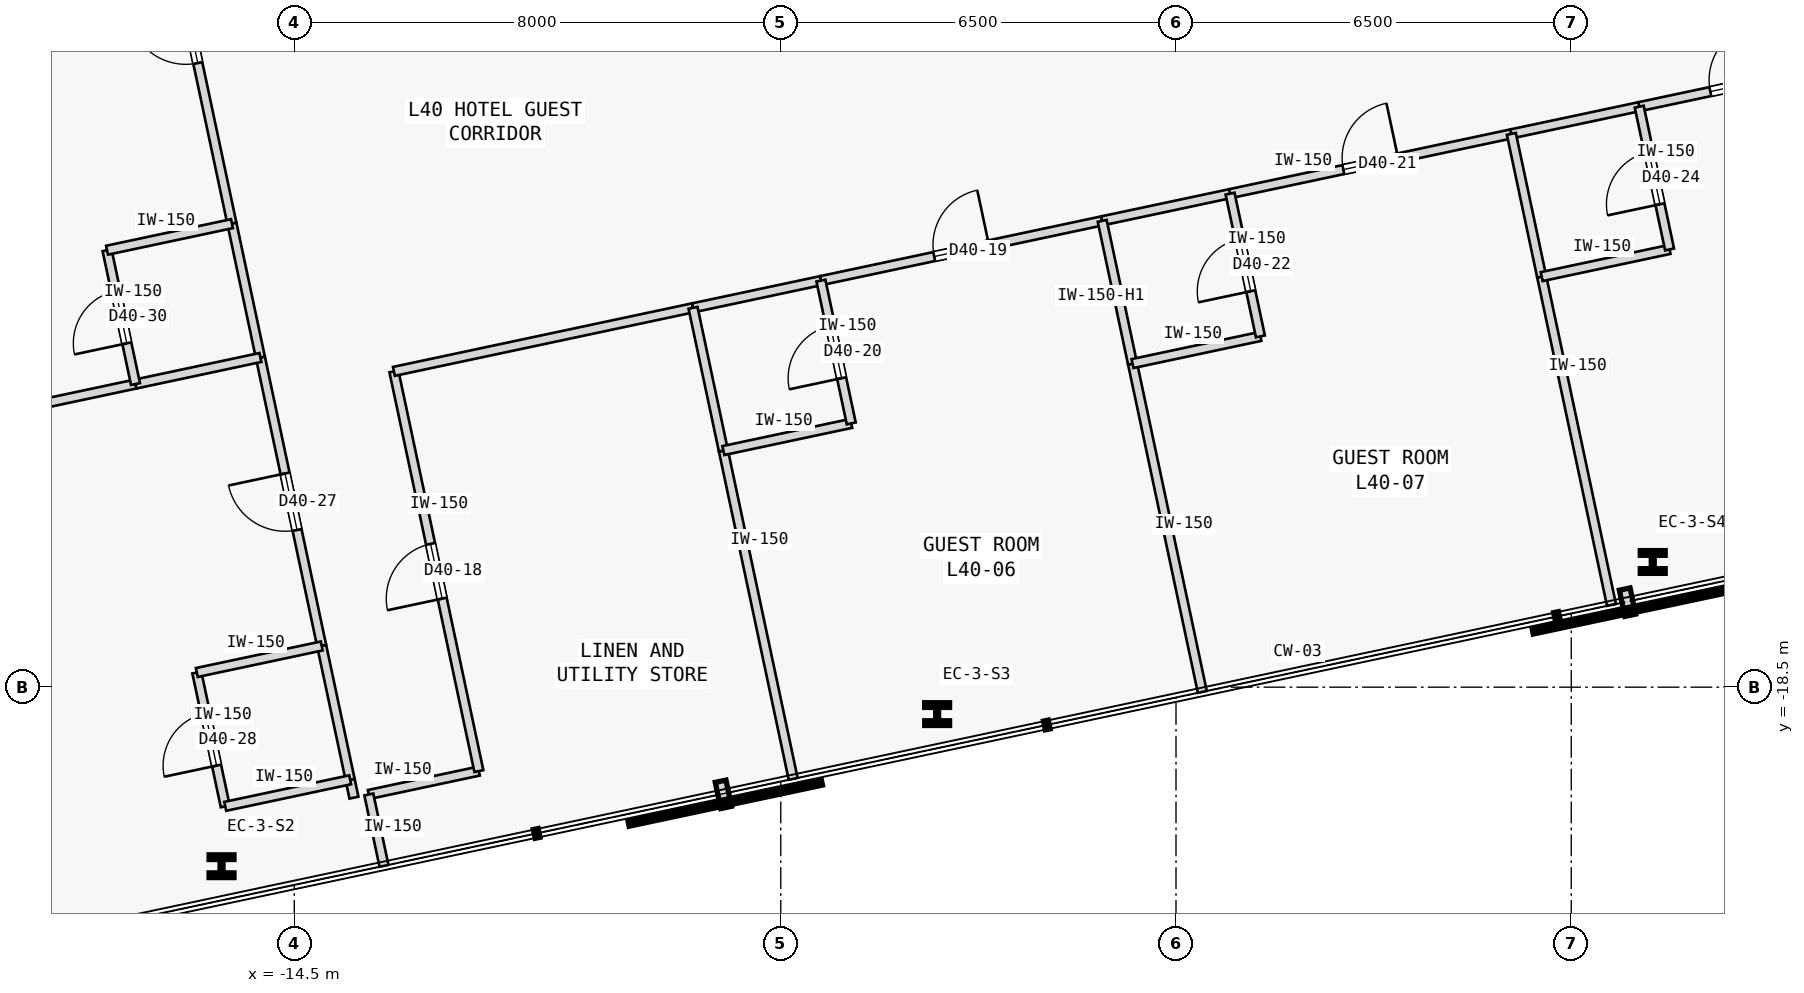
"""IFC4 building model, lengths in metres.
Left out: names, types, materials, properties, quantities, classifications, styles, units other than length and angle.
Written with IfcOpenShell. Run it as: python <this file> out.ifc"""

import sys

from ifc_helpers import new_model, si_unit, direction, frame, frame_2d, origin, origin_2d, place, context, subcontext, project, spatial, rectangle, i_section, extrude, element, fill, save


model = new_model("IFC4")
c1 = context("Model", 3, precision=1e-05, world=origin(), true_north=direction((0.0, 1.0)))
c2 = subcontext(c1, "Body", "Model", "MODEL_VIEW")
j1 = project(units=[si_unit("LENGTHUNIT", "METRE"), si_unit("PLANEANGLEUNIT", "RADIAN")], contexts=[c1])
p1 = place(None, origin())
s1 = spatial("IfcSite", under=j1, at=p1, CompositionType="ELEMENT")
p2 = place(p1, origin())
s2 = spatial("IfcBuilding", under=s1, at=p2, CompositionType="ELEMENT")
p3 = place(p2, frame((0.0, 0.0, 158.2)))
s3 = spatial("IfcBuildingStorey", under=s2, at=p3, CompositionType="ELEMENT", Elevation=158.2)
for number, where, z_axis, x_axis in (
    (1, (-15.697, -21.444, 0.0), (0.0, 0.0, 1.0), (1.0, 0.0, 0.0)),
    (2, (-3.928, -18.943, 0.0), (0.0, 0.0, 1.0), (1.0, 0.0, 0.0)),
    (3, (7.84, -16.441, 0.0), (0.0, 0.0, 1.0), (1.0, 0.0, 0.0)),
):
    element("IfcColumn", number, at=place(p3, frame(where, z_axis=z_axis, x_axis=x_axis)), inside=s3, PredefinedType="COLUMN", context=c2, shape_type="SweptSolid", body=[
        extrude(i_section(OverallWidth=0.409, OverallDepth=0.374, WebThickness=0.048, FlangeThickness=0.077, FilletRadius=0.015, at=origin_2d()), origin(), (0.0, 0.0, 1.0), 3.4),
    ])
p4 = place(p3, frame((-13.274, -20.265, 0.0), z_axis=(0.0, 0.0, 1.0), x_axis=(0.978160192495, 0.207852442415, 0.0)))
e4 = element("IfcWall", 4, at=p4, inside=s3, PredefinedType="PARTITIONING", context=c2, shape_type="SweptSolid", body=[
    extrude(rectangle(XDim=1.85, YDim=0.15, at=frame_2d((0.925, 0.0))), origin(), (0.0, 0.0, 1.0), 3.175),
])
p5 = place(p3, frame((-11.465, -19.88, 0.0), z_axis=(0.0, 0.0, 1.0), x_axis=(-0.207916109912, 0.978146661416, 0.0)))
e5 = element("IfcWall", 5, at=p5, inside=s3, PredefinedType="PARTITIONING", context=c2, shape_type="SweptSolid", body=[
    extrude(rectangle(XDim=6.72, YDim=0.15, at=frame_2d((3.36, 0.0))), origin(), (0.0, 0.0, 1.0), 3.175),
])
p6 = place(p5, frame((2.9, 0.0, 0.0)))
e6 = element("IfcOpeningElement", 6, at=p6, cuts=e5, PredefinedType="OPENING", context=c2, shape_type="SweptSolid", body=[
    extrude(rectangle(XDim=0.92, YDim=2.15, at=frame_2d((0.46, 1.075))), frame((0.0, 0.085, 0.0), z_axis=(0.0, -1.0, 0.0), x_axis=(1.0, 0.0, 0.0)), (0.0, 0.0, 1.0), 0.17),
])
p7 = place(p3, frame((-12.862, -13.307, 0.0), z_axis=(0.0, 0.0, 1.0), x_axis=(0.978145647498, 0.207920879857, 0.0)))
e7 = element("IfcWall", 7, at=p7, inside=s3, PredefinedType="PARTITIONING", context=c2, shape_type="SweptSolid", body=[
    extrude(rectangle(XDim=5.029, YDim=0.15, at=frame_2d((2.515, 0.0))), origin(), (0.0, 0.0, 1.0), 3.175),
])
p8 = place(p3, frame((-5.84, -11.814, 0.0), z_axis=(0.0, 0.0, 1.0), x_axis=(0.978148615161, 0.207906918255, 0.0)))
e8 = element("IfcWall", 8, at=p8, inside=s3, PredefinedType="PARTITIONING", context=c2, shape_type="SweptSolid", body=[
    extrude(rectangle(XDim=4.729, YDim=0.15, at=frame_2d((2.364, 0.0))), origin(), (0.0, 0.0, 1.0), 3.175),
])
p9 = place(p8, frame((1.905, 0.0, 0.0)))
e9 = element("IfcOpeningElement", 9, at=p9, cuts=e8, PredefinedType="OPENING", context=c2, shape_type="SweptSolid", body=[
    extrude(rectangle(XDim=0.92, YDim=2.15, at=frame_2d((0.46, 1.075))), frame((0.0, 0.085, 0.0), z_axis=(0.0, -1.0, 0.0), x_axis=(1.0, 0.0, 0.0)), (0.0, 0.0, 1.0), 0.17),
])
p10 = place(p3, frame((-7.943, -12.261, 0.0), z_axis=(0.0, 0.0, 1.0), x_axis=(0.978146728319, 0.207915795165, 0.0)))
e10 = element("IfcWall", 10, at=p10, inside=s3, PredefinedType="PARTITIONING", context=c2, shape_type="SweptSolid", body=[
    extrude(rectangle(XDim=2.15, YDim=0.15, at=frame_2d((1.075, 0.0))), origin(), (0.0, 0.0, 1.0), 3.175),
])
p11 = place(p3, frame((0.889, -10.384, 0.0), z_axis=(0.0, 0.0, 1.0), x_axis=(0.978150846638, 0.207896419455, 0.0)))
e11 = element("IfcWall", 11, at=p11, inside=s3, PredefinedType="PARTITIONING", context=c2, shape_type="SweptSolid", body=[
    extrude(rectangle(XDim=4.729, YDim=0.15, at=frame_2d((2.365, 0.0))), origin(), (0.0, 0.0, 1.0), 3.175),
])
p12 = place(p11, frame((1.905, 0.0, 0.0)))
e12 = element("IfcOpeningElement", 12, at=p12, cuts=e11, PredefinedType="OPENING", context=c2, shape_type="SweptSolid", body=[
    extrude(rectangle(XDim=0.92, YDim=2.15, at=frame_2d((0.46, 1.075))), frame((0.0, 0.085, 0.0), z_axis=(0.0, -1.0, 0.0), x_axis=(1.0, 0.0, 0.0)), (0.0, 0.0, 1.0), 0.17),
])
p13 = place(p3, frame((-1.214, -10.831, 0.0), z_axis=(0.0, 0.0, 1.0), x_axis=(0.978146728319, 0.207915795165, 0.0)))
e13 = element("IfcWall", 13, at=p13, inside=s3, PredefinedType="PARTITIONING", context=c2, shape_type="SweptSolid", body=[
    extrude(rectangle(XDim=2.15, YDim=0.15, at=frame_2d((1.075, 0.0))), origin(), (0.0, 0.0, 1.0), 3.175),
])
p14 = place(p3, frame((7.618, -8.954, 0.0), z_axis=(0.0, 0.0, 1.0), x_axis=(0.978140347221, 0.207945812984, 0.0)))
e14 = element("IfcWall", 14, at=p14, inside=s3, PredefinedType="PARTITIONING", context=c2, shape_type="SweptSolid", body=[
    extrude(rectangle(XDim=4.729, YDim=0.15, at=frame_2d((2.365, 0.0))), origin(), (0.0, 0.0, 1.0), 3.175),
])
p15 = place(p14, frame((1.195, 0.0, 0.0)))
e15 = element("IfcOpeningElement", 15, at=p15, cuts=e14, PredefinedType="OPENING", context=c2, shape_type="SweptSolid", body=[
    extrude(rectangle(XDim=0.92, YDim=2.15, at=frame_2d((0.46, 1.075))), frame((0.0, 0.085, 0.0), z_axis=(0.0, -1.0, 0.0), x_axis=(1.0, 0.0, 0.0)), (0.0, 0.0, 1.0), 0.17),
])
p16 = place(p3, frame((5.515, -9.401, 0.0), z_axis=(0.0, 0.0, 1.0), x_axis=(0.978146728319, 0.207915795165, 0.0)))
e16 = element("IfcWall", 16, at=p16, inside=s3, PredefinedType="PARTITIONING", context=c2, shape_type="SweptSolid", body=[
    extrude(rectangle(XDim=2.15, YDim=0.15, at=frame_2d((1.075, 0.0))), origin(), (0.0, 0.0, 1.0), 3.175),
])
p17 = place(p3, frame((-13.519, -20.317, 0.0), z_axis=(0.0, 0.0, 1.0), x_axis=(-0.207527808066, 0.978229118806, 0.0)))
e17 = element("IfcWall", 17, at=p17, inside=s3, PredefinedType="PARTITIONING", context=c2, shape_type="SweptSolid", body=[
    extrude(rectangle(XDim=0.3, YDim=0.15, at=frame_2d((0.15, 0.0))), origin(), (0.0, 0.0, 1.0), 3.175),
])
p18 = place(p3, frame((-14.049, -17.823, 0.0), z_axis=(0.0, 0.0, 1.0), x_axis=(-0.2079027059, 0.978149510494, 0.0)))
e18 = element("IfcWall", 18, at=p18, inside=s3, PredefinedType="PARTITIONING", context=c2, shape_type="SweptSolid", body=[
    extrude(rectangle(XDim=4.85, YDim=0.15, at=frame_2d((2.425, 0.0))), origin(), (0.0, 0.0, 1.0), 3.175),
])
p19 = place(p18, frame((1.95, 0.0, 0.0)))
e19 = element("IfcOpeningElement", 19, at=p19, cuts=e18, PredefinedType="OPENING", context=c2, shape_type="SweptSolid", body=[
    extrude(rectangle(XDim=0.95, YDim=2.15, at=frame_2d((0.475, 1.075))), frame((0.0, 0.085, 0.0), z_axis=(0.0, -1.0, 0.0), x_axis=(1.0, 0.0, 0.0)), (0.0, 0.0, 1.0), 0.17),
])
p20 = place(p3, frame((-13.581, -20.023, 0.0), z_axis=(0.0, 0.0, 1.0), x_axis=(-0.207891197838, 0.978151956427, 0.0)))
e20 = element("IfcWall", 20, at=p20, inside=s3, PredefinedType="PARTITIONING", context=c2, shape_type="SweptSolid", body=[
    extrude(rectangle(XDim=2.25, YDim=0.15, at=frame_2d((1.125, 0.0))), origin(), (0.0, 0.0, 1.0), 3.175),
])
p21 = place(p3, frame((-15.525, -10.878, 0.0), z_axis=(0.0, 0.0, 1.0), x_axis=(-0.207887725283, 0.978152694459, 0.0)))
e21 = element("IfcWall", 21, at=p21, inside=s3, PredefinedType="PARTITIONING", context=c2, shape_type="SweptSolid", body=[
    extrude(rectangle(XDim=6.35, YDim=0.15, at=frame_2d((3.175, 0.0))), origin(), (0.0, 0.0, 1.0), 3.175),
])
p22 = place(p21, frame((2.7, 0.0, 0.0)))
e22 = element("IfcOpeningElement", 22, at=p22, cuts=e21, PredefinedType="OPENING", context=c2, shape_type="SweptSolid", body=[
    extrude(rectangle(XDim=0.95, YDim=2.15, at=frame_2d((0.475, 1.075))), frame((0.0, 0.085, 0.0), z_axis=(0.0, -1.0, 0.0), x_axis=(1.0, 0.0, 0.0)), (0.0, 0.0, 1.0), 0.17),
])
p23 = place(p3, frame((-15.057, -13.079, 0.0), z_axis=(0.0, 0.0, 1.0), x_axis=(-0.207995007687, 0.978129887478, 0.0)))
e23 = element("IfcWall", 23, at=p23, inside=s3, PredefinedType="PARTITIONING", context=c2, shape_type="SweptSolid", body=[
    extrude(rectangle(XDim=2.25, YDim=0.15, at=frame_2d((1.125, 0.0))), origin(), (0.0, 0.0, 1.0), 3.175),
])
p24 = place(p3, frame((-6.296, -20.008, 0.0), z_axis=(0.0, 0.0, 1.0), x_axis=(-0.20792487872, 0.978144797466, 0.0)))
e24 = element("IfcWall", 24, at=p24, inside=s3, PredefinedType="PARTITIONING", context=c2, shape_type="SweptSolid", body=[
    extrude(rectangle(XDim=5.52, YDim=0.15, at=frame_2d((2.76, 0.0))), origin(), (0.0, 0.0, 1.0), 3.175),
])
p25 = place(p3, frame((-7.444, -14.609, 0.0), z_axis=(0.0, 0.0, 1.0), x_axis=(-0.207917150959, 0.978146440129, 0.0)))
e25 = element("IfcWall", 25, at=p25, inside=s3, PredefinedType="PARTITIONING", context=c2, shape_type="SweptSolid", body=[
    extrude(rectangle(XDim=2.4, YDim=0.15, at=frame_2d((1.2, 0.0))), origin(), (0.0, 0.0, 1.0), 3.175),
])
p26 = place(p3, frame((-13.025, -21.439, 0.0), z_axis=(0.0, 0.0, 1.0), x_axis=(-0.207917150959, 0.978146440129, 0.0)))
e26 = element("IfcWall", 26, at=p26, inside=s3, PredefinedType="PARTITIONING", context=c2, shape_type="SweptSolid", body=[
    extrude(rectangle(XDim=1.2, YDim=0.15, at=frame_2d((0.6, 0.0))), origin(), (0.0, 0.0, 1.0), 3.175),
])
p27 = place(p3, frame((-7.444, -14.609, 0.0), z_axis=(0.0, 0.0, 1.0), x_axis=(0.978141818715, 0.207938891219, 0.0)))
e27 = element("IfcWall", 27, at=p27, inside=s3, PredefinedType="PARTITIONING", context=c2, shape_type="SweptSolid", body=[
    extrude(rectangle(XDim=2.15, YDim=0.15, at=frame_2d((1.075, 0.0))), origin(), (0.0, 0.0, 1.0), 3.175),
])
p28 = place(p3, frame((-5.341, -14.162, 0.0), z_axis=(0.0, 0.0, 1.0), x_axis=(-0.207819824493, 0.978167123015, 0.0)))
e28 = element("IfcWall", 28, at=p28, inside=s3, PredefinedType="PARTITIONING", context=c2, shape_type="SweptSolid", body=[
    extrude(rectangle(XDim=2.4, YDim=0.15, at=frame_2d((1.2, 0.0))), origin(), (0.0, 0.0, 1.0), 3.175),
])
p29 = place(p28, frame((0.76, 0.0, 0.0)))
e29 = element("IfcOpeningElement", 29, at=p29, cuts=e28, PredefinedType="OPENING", context=c2, shape_type="SweptSolid", body=[
    extrude(rectangle(XDim=0.88, YDim=2.15, at=frame_2d((0.44, 1.075))), frame((0.0, 0.085, 0.0), z_axis=(0.0, -1.0, 0.0), x_axis=(1.0, 0.0, 0.0)), (0.0, 0.0, 1.0), 0.17),
])
p30 = place(p3, frame((0.433, -18.578, 0.0), z_axis=(0.0, 0.0, 1.0), x_axis=(-0.20791588359, 0.978146709523, 0.0)))
e30 = element("IfcWall", 30, at=p30, inside=s3, PredefinedType="PARTITIONING", context=c2, shape_type="SweptSolid", body=[
    extrude(rectangle(XDim=5.52, YDim=0.15, at=frame_2d((2.76, 0.0))), origin(), (0.0, 0.0, 1.0), 3.175),
])
p31 = place(p3, frame((-0.715, -13.179, 0.0), z_axis=(0.0, 0.0, 1.0), x_axis=(-0.207937840262, 0.978142042133, 0.0)))
e31 = element("IfcWall", 31, at=p31, inside=s3, PredefinedType="PARTITIONING", context=c2, shape_type="SweptSolid", body=[
    extrude(rectangle(XDim=2.4, YDim=0.15, at=frame_2d((1.2, 0.0))), origin(), (0.0, 0.0, 1.0), 2.725),
])
p32 = place(p3, frame((-0.715, -13.179, 0.0), z_axis=(0.0, 0.0, 1.0), x_axis=(0.978146728319, 0.207915795165, 0.0)))
e32 = element("IfcWall", 32, at=p32, inside=s3, PredefinedType="PARTITIONING", context=c2, shape_type="SweptSolid", body=[
    extrude(rectangle(XDim=2.15, YDim=0.15, at=frame_2d((1.075, 0.0))), origin(), (0.0, 0.0, 1.0), 3.175),
])
p33 = place(p3, frame((1.388, -12.732, 0.0), z_axis=(0.0, 0.0, 1.0), x_axis=(-0.207937840262, 0.978142042133, 0.0)))
e33 = element("IfcWall", 33, at=p33, inside=s3, PredefinedType="PARTITIONING", context=c2, shape_type="SweptSolid", body=[
    extrude(rectangle(XDim=2.4, YDim=0.15, at=frame_2d((1.2, 0.0))), origin(), (0.0, 0.0, 1.0), 3.175),
])
p34 = place(p33, frame((0.76, 0.0, 0.0)))
e34 = element("IfcOpeningElement", 34, at=p34, cuts=e33, PredefinedType="OPENING", context=c2, shape_type="SweptSolid", body=[
    extrude(rectangle(XDim=0.88, YDim=2.15, at=frame_2d((0.44, 1.075))), frame((0.0, 0.085, 0.0), z_axis=(0.0, -1.0, 0.0), x_axis=(1.0, 0.0, 0.0)), (0.0, 0.0, 1.0), 0.17),
])
p35 = place(p3, frame((7.161, -17.148, 0.0), z_axis=(0.0, 0.0, 1.0), x_axis=(-0.20791588359, 0.978146709523, 0.0)))
e35 = element("IfcWall", 35, at=p35, inside=s3, PredefinedType="PARTITIONING", context=c2, shape_type="SweptSolid", body=[
    extrude(rectangle(XDim=5.52, YDim=0.15, at=frame_2d((2.76, 0.0))), origin(), (0.0, 0.0, 1.0), 3.175),
])
p36 = place(p3, frame((6.014, -11.749, 0.0), z_axis=(0.0, 0.0, 1.0), x_axis=(-0.207937840262, 0.978142042133, 0.0)))
e36 = element("IfcWall", 36, at=p36, inside=s3, PredefinedType="PARTITIONING", context=c2, shape_type="SweptSolid", body=[
    extrude(rectangle(XDim=2.4, YDim=0.15, at=frame_2d((1.2, 0.0))), origin(), (0.0, 0.0, 1.0), 3.175),
])
p37 = place(p3, frame((6.014, -11.749, 0.0), z_axis=(0.0, 0.0, 1.0), x_axis=(0.978146728319, 0.207915795165, 0.0)))
e37 = element("IfcWall", 37, at=p37, inside=s3, PredefinedType="PARTITIONING", context=c2, shape_type="SweptSolid", body=[
    extrude(rectangle(XDim=2.15, YDim=0.15, at=frame_2d((1.075, 0.0))), origin(), (0.0, 0.0, 1.0), 3.175),
])
p38 = place(p3, frame((8.117, -11.302, 0.0), z_axis=(0.0, 0.0, 1.0), x_axis=(-0.207937840262, 0.978142042133, 0.0)))
e38 = element("IfcWall", 38, at=p38, inside=s3, PredefinedType="PARTITIONING", context=c2, shape_type="SweptSolid", body=[
    extrude(rectangle(XDim=2.4, YDim=0.15, at=frame_2d((1.2, 0.0))), origin(), (0.0, 0.0, 1.0), 3.175),
])
p39 = place(p38, frame((0.76, 0.0, 0.0)))
e39 = element("IfcOpeningElement", 39, at=p39, cuts=e38, PredefinedType="OPENING", context=c2, shape_type="SweptSolid", body=[
    extrude(rectangle(XDim=0.88, YDim=2.15, at=frame_2d((0.44, 1.075))), frame((0.0, 0.085, 0.0), z_axis=(0.0, -1.0, 0.0), x_axis=(1.0, 0.0, 0.0)), (0.0, 0.0, 1.0), 0.17),
])
p40 = place(p3, frame((-15.635, -20.46, 0.0), z_axis=(0.0, 0.0, 1.0), x_axis=(-0.207913264065, 0.978147266328, 0.0)))
e40 = element("IfcWall", 40, at=p40, inside=s3, PredefinedType="PARTITIONING", context=c2, shape_type="SweptSolid", body=[
    extrude(rectangle(XDim=2.25, YDim=0.15, at=frame_2d((1.125, 0.0))), origin(), (0.0, 0.0, 1.0), 3.175),
])
p41 = place(p40, frame((0.685, 0.0, 0.0)))
e41 = element("IfcOpeningElement", 41, at=p41, cuts=e40, PredefinedType="OPENING", context=c2, shape_type="SweptSolid", body=[
    extrude(rectangle(XDim=0.88, YDim=2.15, at=frame_2d((0.44, 1.075))), frame((0.0, 0.085, 0.0), z_axis=(0.0, -1.0, 0.0), x_axis=(1.0, 0.0, 0.0)), (0.0, 0.0, 1.0), 0.17),
])
for number, where, z_axis, x_axis in (
    (42, (-15.635, -20.46, 0.0), (0.0, 0.0, 1.0), (0.978, 0.208, 0.0)),
    (43, (-16.103, -18.259, 0.0), (0.0, 0.0, 1.0), (0.978, 0.208, 0.0)),
):
    element("IfcWall", number, at=place(p3, frame(where, z_axis=z_axis, x_axis=x_axis)), inside=s3, PredefinedType="PARTITIONING", context=c2, shape_type="SweptSolid", body=[
        extrude(rectangle(XDim=2.1, YDim=0.15, at=frame_2d((1.05, 0.0))), origin(), (0.0, 0.0, 1.0), 3.175),
    ])
p42 = place(p3, frame((-32.486, -16.783, 0.0), z_axis=(0.0, 0.0, 1.0), x_axis=(0.978146137903, 0.207918572776, 0.0)))
e44 = element("IfcWall", 44, at=p42, inside=s3, PredefinedType="PARTITIONING", context=c2, shape_type="SweptSolid", body=[
    extrude(rectangle(XDim=15.718, YDim=0.15, at=frame_2d((7.859, 0.0))), origin(), (0.0, 0.0, 1.0), 3.175),
])
p43 = place(p3, frame((-17.111, -13.515, 0.0), z_axis=(0.0, 0.0, 1.0), x_axis=(0.97815826, 0.207861536591, 0.0)))
e45 = element("IfcWall", 45, at=p43, inside=s3, PredefinedType="PARTITIONING", context=c2, shape_type="SweptSolid", body=[
    extrude(rectangle(XDim=2.1, YDim=0.15, at=frame_2d((1.05, 0.0))), origin(), (0.0, 0.0, 1.0), 3.175),
])
p44 = place(p3, frame((-17.111, -13.515, 0.0), z_axis=(0.0, 0.0, 1.0), x_axis=(-0.207913264065, 0.978147266328, 0.0)))
e46 = element("IfcWall", 46, at=p44, inside=s3, PredefinedType="PARTITIONING", context=c2, shape_type="SweptSolid", body=[
    extrude(rectangle(XDim=2.25, YDim=0.15, at=frame_2d((1.125, 0.0))), origin(), (0.0, 0.0, 1.0), 3.175),
])
p45 = place(p44, frame((0.685, 0.0, 0.0)))
e47 = element("IfcOpeningElement", 47, at=p45, cuts=e46, PredefinedType="OPENING", context=c2, shape_type="SweptSolid", body=[
    extrude(rectangle(XDim=0.88, YDim=2.15, at=frame_2d((0.44, 1.075))), frame((0.0, 0.085, 0.0), z_axis=(0.0, -1.0, 0.0), x_axis=(1.0, 0.0, 0.0)), (0.0, 0.0, 1.0), 0.17),
])
p46 = place(p3, frame((-17.579, -11.314, 0.0), z_axis=(0.0, 0.0, 1.0), x_axis=(0.978129588365, 0.207996414309, 0.0)))
e48 = element("IfcWall", 48, at=p46, inside=s3, PredefinedType="PARTITIONING", context=c2, shape_type="SweptSolid", body=[
    extrude(rectangle(XDim=2.1, YDim=0.15, at=frame_2d((1.05, 0.0))), origin(), (0.0, 0.0, 1.0), 3.175),
])
p47 = place(p6, origin())
e49 = element("IfcDoor", 49, at=p47, inside=s3, OperationType="SINGLE_SWING_LEFT", PredefinedType="DOOR", context=c2, shape_type="SweptSolid", body=[
    extrude(rectangle(XDim=0.92, YDim=2.15, at=frame_2d((0.46, 1.075))), frame((0.0, 0.025, 0.0), z_axis=(0.0, -1.0, 0.0), x_axis=(1.0, 0.0, 0.0)), (0.0, 0.0, 1.0), 0.05),
])
fill(e6, e49)
p48 = place(p9, origin())
e50 = element("IfcDoor", 50, at=p48, inside=s3, OperationType="SINGLE_SWING_RIGHT", PredefinedType="DOOR", context=c2, shape_type="SweptSolid", body=[
    extrude(rectangle(XDim=0.92, YDim=2.15, at=frame_2d((0.46, 1.075))), frame((0.0, 0.025, 0.0), z_axis=(0.0, -1.0, 0.0), x_axis=(1.0, 0.0, 0.0)), (0.0, 0.0, 1.0), 0.05),
])
fill(e9, e50)
p49 = place(p29, origin())
e51 = element("IfcDoor", 51, at=p49, inside=s3, OperationType="SINGLE_SWING_LEFT", PredefinedType="DOOR", context=c2, shape_type="SweptSolid", body=[
    extrude(rectangle(XDim=0.88, YDim=2.15, at=frame_2d((0.44, 1.075))), frame((0.0, 0.025, 0.0), z_axis=(0.0, -1.0, 0.0), x_axis=(1.0, 0.0, 0.0)), (0.0, 0.0, 1.0), 0.05),
])
fill(e29, e51)
p50 = place(p12, origin())
e52 = element("IfcDoor", 52, at=p50, inside=s3, OperationType="SINGLE_SWING_RIGHT", PredefinedType="DOOR", context=c2, shape_type="SweptSolid", body=[
    extrude(rectangle(XDim=0.92, YDim=2.15, at=frame_2d((0.46, 1.075))), frame((0.0, 0.025, 0.0), z_axis=(0.0, -1.0, 0.0), x_axis=(1.0, 0.0, 0.0)), (0.0, 0.0, 1.0), 0.05),
])
fill(e12, e52)
p51 = place(p34, origin())
e53 = element("IfcDoor", 53, at=p51, inside=s3, OperationType="SINGLE_SWING_LEFT", PredefinedType="DOOR", context=c2, shape_type="SweptSolid", body=[
    extrude(rectangle(XDim=0.88, YDim=2.15, at=frame_2d((0.44, 1.075))), frame((0.0, 0.025, 0.0), z_axis=(0.0, -1.0, 0.0), x_axis=(1.0, 0.0, 0.0)), (0.0, 0.0, 1.0), 0.05),
])
fill(e34, e53)
p52 = place(p15, origin())
e54 = element("IfcDoor", 54, at=p52, inside=s3, OperationType="SINGLE_SWING_RIGHT", PredefinedType="DOOR", context=c2, shape_type="SweptSolid", body=[
    extrude(rectangle(XDim=0.92, YDim=2.15, at=frame_2d((0.46, 1.075))), frame((0.0, 0.025, 0.0), z_axis=(0.0, -1.0, 0.0), x_axis=(1.0, 0.0, 0.0)), (0.0, 0.0, 1.0), 0.05),
])
fill(e15, e54)
p53 = place(p39, origin())
e55 = element("IfcDoor", 55, at=p53, inside=s3, OperationType="SINGLE_SWING_LEFT", PredefinedType="DOOR", context=c2, shape_type="SweptSolid", body=[
    extrude(rectangle(XDim=0.88, YDim=2.15, at=frame_2d((0.44, 1.075))), frame((0.0, 0.025, 0.0), z_axis=(0.0, -1.0, 0.0), x_axis=(1.0, 0.0, 0.0)), (0.0, 0.0, 1.0), 0.05),
])
fill(e39, e55)
p54 = place(p19, origin())
e56 = element("IfcDoor", 56, at=p54, inside=s3, OperationType="SINGLE_SWING_RIGHT", PredefinedType="DOOR", context=c2, shape_type="SweptSolid", body=[
    extrude(rectangle(XDim=0.95, YDim=2.15, at=frame_2d((0.475, 1.075))), frame((0.0, 0.025, 0.0), z_axis=(0.0, -1.0, 0.0), x_axis=(1.0, 0.0, 0.0)), (0.0, 0.0, 1.0), 0.05),
])
fill(e19, e56)
p55 = place(p41, origin())
e57 = element("IfcDoor", 57, at=p55, inside=s3, OperationType="SINGLE_SWING_LEFT", PredefinedType="DOOR", context=c2, shape_type="SweptSolid", body=[
    extrude(rectangle(XDim=0.88, YDim=2.15, at=frame_2d((0.44, 1.075))), frame((0.0, 0.025, 0.0), z_axis=(0.0, -1.0, 0.0), x_axis=(1.0, 0.0, 0.0)), (0.0, 0.0, 1.0), 0.05),
])
fill(e41, e57)
p56 = place(p22, origin())
e58 = element("IfcDoor", 58, at=p56, inside=s3, OperationType="SINGLE_SWING_RIGHT", PredefinedType="DOOR", context=c2, shape_type="SweptSolid", body=[
    extrude(rectangle(XDim=0.95, YDim=2.15, at=frame_2d((0.475, 1.075))), frame((0.0, 0.025, 0.0), z_axis=(0.0, -1.0, 0.0), x_axis=(1.0, 0.0, 0.0)), (0.0, 0.0, 1.0), 0.05),
])
fill(e22, e58)
p57 = place(p45, origin())
e59 = element("IfcDoor", 59, at=p57, inside=s3, OperationType="SINGLE_SWING_LEFT", PredefinedType="DOOR", context=c2, shape_type="SweptSolid", body=[
    extrude(rectangle(XDim=0.88, YDim=2.15, at=frame_2d((0.44, 1.075))), frame((0.0, 0.025, 0.0), z_axis=(0.0, -1.0, 0.0), x_axis=(1.0, 0.0, 0.0)), (0.0, 0.0, 1.0), 0.05),
])
fill(e47, e59)
save(model, sys.argv[1])
